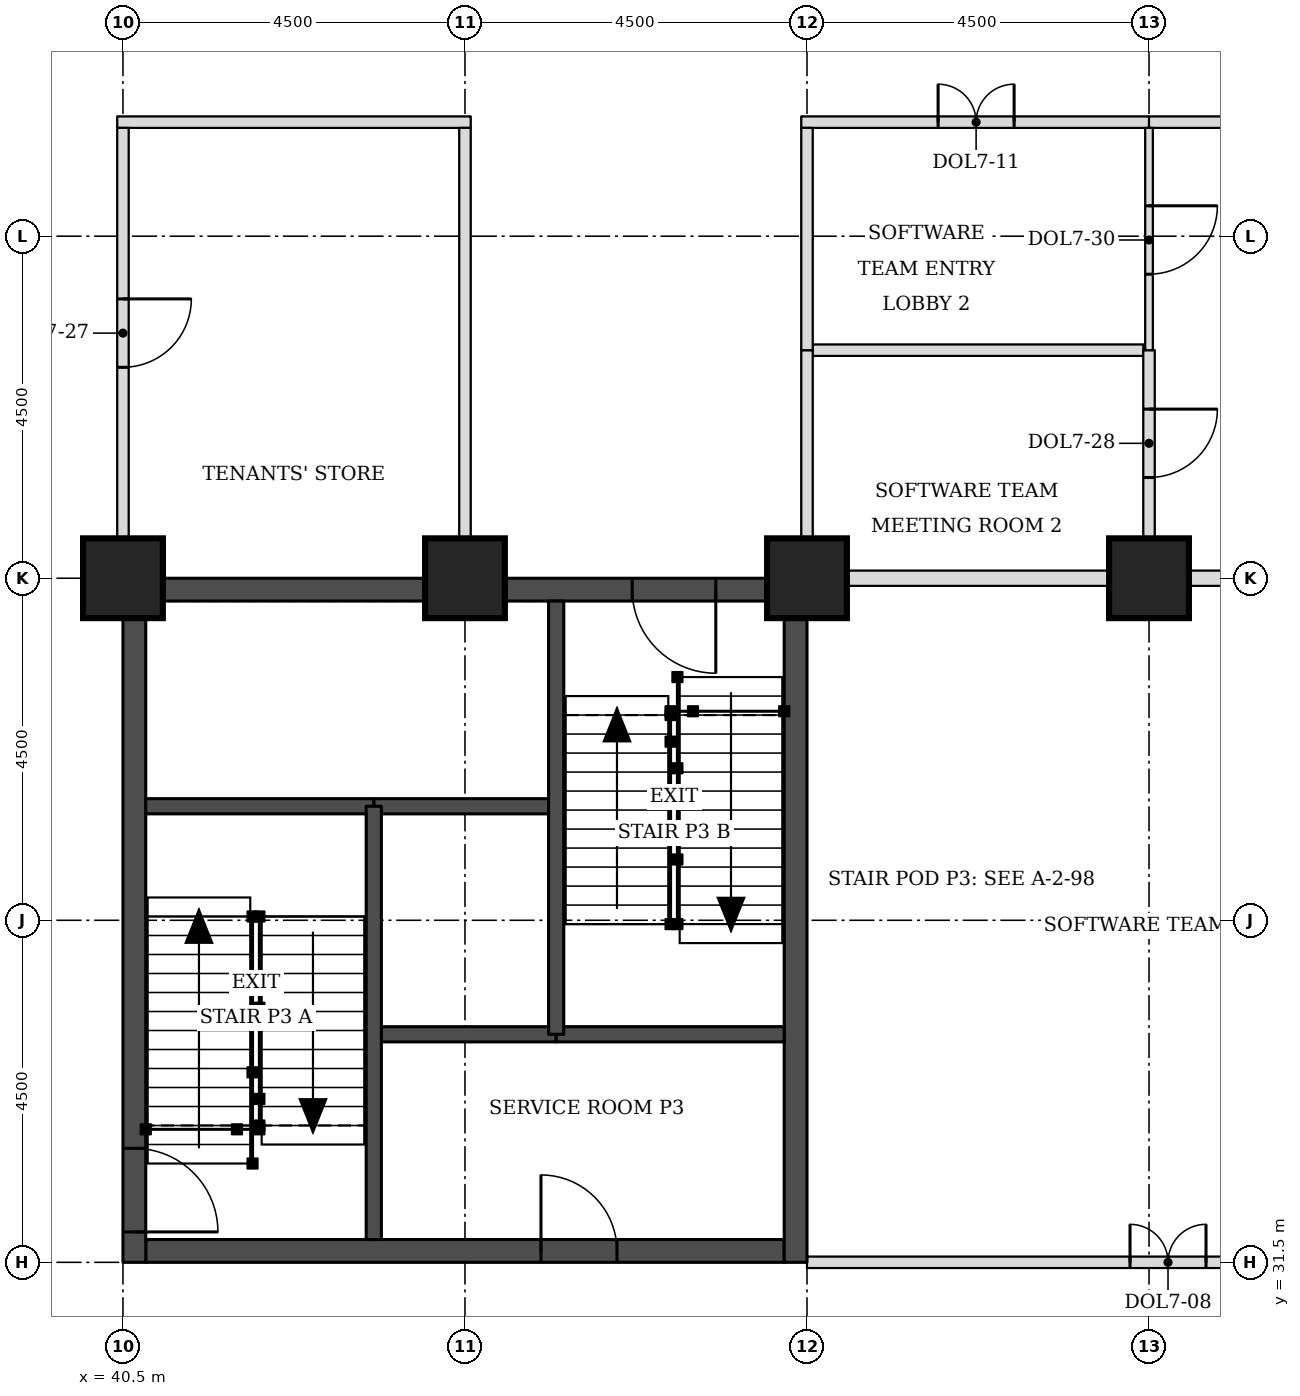
"""IFC4 building model, lengths in metres.
Left out: names, types, materials, properties, quantities, classifications, styles, units other than length and angle.
Written with IfcOpenShell. Run it as: python <this file> out.ifc"""

import sys

from ifc_helpers import new_model, si_unit, direction, frame, frame_2d, origin, origin_2d, place, context, subcontext, project, spatial, rectangle, extrude, element, fill, save


model = new_model("IFC4")
c1 = context("Model", 3, precision=1e-05, world=origin(), true_north=direction((0.0, 1.0)))
c2 = subcontext(c1, "Body", "Model", "MODEL_VIEW")
j1 = project(units=[si_unit("LENGTHUNIT", "METRE"), si_unit("PLANEANGLEUNIT", "RADIAN")], contexts=[c1])
p1 = place(None, origin())
s1 = spatial("IfcSite", under=j1, at=p1, CompositionType="ELEMENT")
p2 = place(p1, origin())
s2 = spatial("IfcBuilding", under=s1, at=p2, CompositionType="ELEMENT")
p3 = place(p2, frame((0.0, 0.0, 127.0)))
s3 = spatial("IfcBuildingStorey", under=s2, at=p3, CompositionType="ELEMENT", Elevation=127.0)
for number, where, z_axis, x_axis in (
    (1, (40.5, 40.5, 0.0), (0.0, 0.0, 1.0), (1.0, 0.0, 0.0)),
    (2, (45.0, 40.5, 0.0), (0.0, 0.0, 1.0), (1.0, 0.0, 0.0)),
    (3, (49.5, 40.5, 0.0), (0.0, 0.0, 1.0), (1.0, 0.0, 0.0)),
    (4, (54.0, 40.5, 0.0), (0.0, 0.0, 1.0), (1.0, 0.0, 0.0)),
):
    element("IfcColumn", number, at=place(p3, frame(where, z_axis=z_axis, x_axis=x_axis)), inside=s3, PredefinedType="COLUMN", context=c2, shape_type="SweptSolid", body=[
        extrude(rectangle(XDim=1.05, YDim=1.05, at=origin_2d()), origin(), (0.0, 0.0, 1.0), 3.7),
    ])
p4 = place(p3, frame((40.8, 31.65, 0.0), z_axis=(0.0, 0.0, 1.0), x_axis=(1.0, 0.0, 0.0)))
e5 = element("IfcWall", 5, at=p4, inside=s3, PredefinedType="SHEAR", context=c2, shape_type="SweptSolid", body=[
    extrude(rectangle(XDim=8.4, YDim=0.3, at=frame_2d((4.2, 0.0))), origin(), (0.0, 0.0, 1.0), 3.7),
])
p5 = place(p4, frame((5.2, 0.0, 0.0)))
e6 = element("IfcOpeningElement", 6, at=p5, cuts=e5, PredefinedType="OPENING", context=c2, shape_type="SweptSolid", body=[
    extrude(rectangle(XDim=1.0, YDim=2.1, at=frame_2d((0.5, 1.05))), frame((0.0, 0.16, 0.0), z_axis=(0.0, -1.0, 0.0), x_axis=(1.0, 0.0, 0.0)), (0.0, 0.0, 1.0), 0.32),
])
p6 = place(p3, frame((40.8, 40.35, 0.0), z_axis=(0.0, 0.0, 1.0), x_axis=(1.0, 0.0, 0.0)))
e7 = element("IfcWall", 7, at=p6, inside=s3, PredefinedType="SHEAR", context=c2, shape_type="SweptSolid", body=[
    extrude(rectangle(XDim=8.4, YDim=0.3, at=frame_2d((4.2, 0.0))), origin(), (0.0, 0.0, 1.0), 3.7),
])
p7 = place(p6, frame((6.4, 0.0, 0.0)))
e8 = element("IfcOpeningElement", 8, at=p7, cuts=e7, PredefinedType="OPENING", context=c2, shape_type="SweptSolid", body=[
    extrude(rectangle(XDim=1.1, YDim=2.1, at=frame_2d((0.55, 1.05))), frame((0.0, 0.16, 0.0), z_axis=(0.0, -1.0, 0.0), x_axis=(1.0, 0.0, 0.0)), (0.0, 0.0, 1.0), 0.32),
])
p8 = place(p3, frame((40.65, 31.5, 0.0), z_axis=(0.0, 0.0, 1.0), x_axis=(0.0, 1.0, 0.0)))
e9 = element("IfcWall", 9, at=p8, inside=s3, PredefinedType="SHEAR", context=c2, shape_type="SweptSolid", body=[
    extrude(rectangle(XDim=9.0, YDim=0.3, at=frame_2d((4.5, 0.0))), origin(), (0.0, 0.0, 1.0), 3.7),
])
p9 = place(p8, frame((0.4, 0.0, 0.0)))
e10 = element("IfcOpeningElement", 10, at=p9, cuts=e9, PredefinedType="OPENING", context=c2, shape_type="SweptSolid", body=[
    extrude(rectangle(XDim=1.1, YDim=2.1, at=frame_2d((0.55, 1.05))), frame((0.0, 0.16, 0.0), z_axis=(0.0, -1.0, 0.0), x_axis=(1.0, 0.0, 0.0)), (0.0, 0.0, 1.0), 0.32),
])
p10 = place(p3, frame((49.35, 31.5, 0.0), z_axis=(0.0, 0.0, 1.0), x_axis=(0.0, 1.0, 0.0)))
e11 = element("IfcWall", 11, at=p10, inside=s3, PredefinedType="SHEAR", context=c2, shape_type="SweptSolid", body=[
    extrude(rectangle(XDim=9.0, YDim=0.3, at=frame_2d((4.5, 0.0))), origin(), (0.0, 0.0, 1.0), 3.7),
])
p11 = place(p3, frame((49.5, 31.5, 0.0), z_axis=(0.0, 0.0, 1.0), x_axis=(1.0, 0.0, 0.0)))
e12 = element("IfcWall", 12, at=p11, inside=s3, PredefinedType="PARTITIONING", context=c2, shape_type="SweptSolid", body=[
    extrude(rectangle(XDim=9.525, YDim=0.15, at=frame_2d((4.762, 0.0))), origin(), (0.0, 0.0, 1.0), 2.55),
])
p12 = place(p11, frame((4.25, 0.0, 0.0)))
e13 = element("IfcOpeningElement", 13, at=p12, cuts=e12, PredefinedType="OPENING", context=c2, shape_type="SweptSolid", body=[
    extrude(rectangle(XDim=1.0, YDim=2.1, at=frame_2d((0.5, 1.05))), frame((0.0, 0.085, 0.0), z_axis=(0.0, -1.0, 0.0), x_axis=(1.0, 0.0, 0.0)), (0.0, 0.0, 1.0), 0.17),
])
p13 = place(p3, frame((50.015, 40.5, 0.0), z_axis=(0.0, 0.0, 1.0), x_axis=(1.0, 0.0, 0.0)))
e14 = element("IfcWall", 14, at=p13, inside=s3, PredefinedType="PARTITIONING", context=c2, shape_type="SweptSolid", body=[
    extrude(rectangle(XDim=3.46, YDim=0.2, at=frame_2d((1.73, 0.0))), origin(), (0.0, 0.0, 1.0), 2.8),
])
p14 = place(p3, frame((54.495, 40.5, 0.0), z_axis=(0.0, 0.0, 1.0), x_axis=(1.0, 0.0, 0.0)))
e15 = element("IfcWall", 15, at=p14, inside=s3, PredefinedType="PARTITIONING", context=c2, shape_type="SweptSolid", body=[
    extrude(rectangle(XDim=3.48, YDim=0.2, at=frame_2d((1.74, 0.0))), origin(), (0.0, 0.0, 1.0), 2.8),
])
p15 = place(p3, frame((49.575, 43.5, 0.0), z_axis=(0.0, 0.0, 1.0), x_axis=(1.0, 0.0, 0.0)))
e16 = element("IfcWall", 16, at=p15, inside=s3, PredefinedType="PARTITIONING", context=c2, shape_type="SweptSolid", body=[
    extrude(rectangle(XDim=4.35, YDim=0.15, at=frame_2d((2.175, 0.0))), origin(), (0.0, 0.0, 1.0), 3.55),
])
p16 = place(p3, frame((40.425, 46.5, 0.0), z_axis=(0.0, 0.0, 1.0), x_axis=(1.0, 0.0, 0.0)))
e17 = element("IfcWall", 17, at=p16, inside=s3, PredefinedType="PARTITIONING", context=c2, shape_type="SweptSolid", body=[
    extrude(rectangle(XDim=4.65, YDim=0.15, at=frame_2d((2.325, 0.0))), origin(), (0.0, 0.0, 1.0), 3.55),
])
p17 = place(p3, frame((49.425, 46.5, 0.0), z_axis=(0.0, 0.0, 1.0), x_axis=(1.0, 0.0, 0.0)))
e18 = element("IfcWall", 18, at=p17, inside=s3, PredefinedType="PARTITIONING", context=c2, shape_type="SweptSolid", body=[
    extrude(rectangle(XDim=4.575, YDim=0.15, at=frame_2d((2.288, 0.0))), origin(), (0.0, 0.0, 1.0), 3.55),
])
p18 = place(p17, frame((1.8, 0.0, 0.0)))
e19 = element("IfcOpeningElement", 19, at=p18, cuts=e18, PredefinedType="OPENING", context=c2, shape_type="SweptSolid", body=[
    extrude(rectangle(XDim=1.0, YDim=2.1, at=frame_2d((0.5, 1.05))), frame((0.0, 0.085, 0.0), z_axis=(0.0, -1.0, 0.0), x_axis=(1.0, 0.0, 0.0)), (0.0, 0.0, 1.0), 0.17),
])
p19 = place(p3, frame((54.0, 46.5, 0.0), z_axis=(0.0, 0.0, 1.0), x_axis=(1.0, 0.0, 0.0)))
e20 = element("IfcWall", 20, at=p19, inside=s3, PredefinedType="PARTITIONING", context=c2, shape_type="SweptSolid", body=[
    extrude(rectangle(XDim=6.0, YDim=0.15, at=frame_2d((3.0, 0.0))), origin(), (0.0, 0.0, 1.0), 3.55),
])
p20 = place(p3, frame((40.5, 41.025, 0.0), z_axis=(0.0, 0.0, 1.0), x_axis=(0.0, 1.0, 0.0)))
e21 = element("IfcWall", 21, at=p20, inside=s3, PredefinedType="PARTITIONING", context=c2, shape_type="SweptSolid", body=[
    extrude(rectangle(XDim=5.4, YDim=0.15, at=frame_2d((2.7, 0.0))), origin(), (0.0, 0.0, 1.0), 3.55),
])
p21 = place(p20, frame((2.25, 0.0, 0.0)))
e22 = element("IfcOpeningElement", 22, at=p21, cuts=e21, PredefinedType="OPENING", context=c2, shape_type="SweptSolid", body=[
    extrude(rectangle(XDim=0.9, YDim=2.1, at=frame_2d((0.45, 1.05))), frame((0.0, 0.085, 0.0), z_axis=(0.0, -1.0, 0.0), x_axis=(1.0, 0.0, 0.0)), (0.0, 0.0, 1.0), 0.17),
])
p22 = place(p3, frame((45.0, 41.025, 0.0), z_axis=(0.0, 0.0, 1.0), x_axis=(0.0, 1.0, 0.0)))
e23 = element("IfcWall", 23, at=p22, inside=s3, PredefinedType="PARTITIONING", context=c2, shape_type="SweptSolid", body=[
    extrude(rectangle(XDim=5.4, YDim=0.15, at=frame_2d((2.7, 0.0))), origin(), (0.0, 0.0, 1.0), 3.55),
])
p23 = place(p3, frame((49.5, 41.025, 0.0), z_axis=(0.0, 0.0, 1.0), x_axis=(0.0, 1.0, 0.0)))
e24 = element("IfcWall", 24, at=p23, inside=s3, PredefinedType="PARTITIONING", context=c2, shape_type="SweptSolid", body=[
    extrude(rectangle(XDim=2.475, YDim=0.15, at=frame_2d((1.238, 0.0))), origin(), (0.0, 0.0, 1.0), 3.55),
])
p24 = place(p3, frame((54.0, 41.025, 0.0), z_axis=(0.0, 0.0, 1.0), x_axis=(0.0, 1.0, 0.0)))
e25 = element("IfcWall", 25, at=p24, inside=s3, PredefinedType="PARTITIONING", context=c2, shape_type="SweptSolid", body=[
    extrude(rectangle(XDim=2.475, YDim=0.15, at=frame_2d((1.238, 0.0))), origin(), (0.0, 0.0, 1.0), 3.55),
])
p25 = place(p24, frame((0.8, 0.0, 0.0)))
e26 = element("IfcOpeningElement", 26, at=p25, cuts=e25, PredefinedType="OPENING", context=c2, shape_type="SweptSolid", body=[
    extrude(rectangle(XDim=0.9, YDim=2.1, at=frame_2d((0.45, 1.05))), frame((0.0, 0.085, 0.0), z_axis=(0.0, -1.0, 0.0), x_axis=(1.0, 0.0, 0.0)), (0.0, 0.0, 1.0), 0.17),
])
p26 = place(p3, frame((49.5, 43.5, 0.0), z_axis=(0.0, 0.0, 1.0), x_axis=(0.0, 1.0, 0.0)))
e27 = element("IfcWall", 27, at=p26, inside=s3, PredefinedType="PARTITIONING", context=c2, shape_type="SweptSolid", body=[
    extrude(rectangle(XDim=2.925, YDim=0.15, at=frame_2d((1.462, 0.0))), origin(), (0.0, 0.0, 1.0), 3.55),
])
p27 = place(p3, frame((54.0, 43.5, 0.0), z_axis=(0.0, 0.0, 1.0), x_axis=(0.0, 1.0, 0.0)))
e28 = element("IfcWall", 28, at=p27, inside=s3, PredefinedType="PARTITIONING", context=c2, shape_type="SweptSolid", body=[
    extrude(rectangle(XDim=2.925, YDim=0.1, at=frame_2d((1.462, 0.0))), origin(), (0.0, 0.0, 1.0), 3.55),
])
p28 = place(p27, frame((1.0, 0.0, 0.0)))
e29 = element("IfcOpeningElement", 29, at=p28, cuts=e28, PredefinedType="OPENING", context=c2, shape_type="SweptSolid", body=[
    extrude(rectangle(XDim=0.9, YDim=2.1, at=frame_2d((0.45, 1.05))), frame((0.0, 0.06, 0.0), z_axis=(0.0, -1.0, 0.0), x_axis=(1.0, 0.0, 0.0)), (0.0, 0.0, 1.0), 0.12),
])
p29 = place(p3, frame((43.8, 34.5, 0.0), z_axis=(0.0, 0.0, 1.0), x_axis=(1.0, 0.0, 0.0)))
e30 = element("IfcWall", 30, at=p29, inside=s3, PredefinedType="SOLIDWALL", context=c2, shape_type="SweptSolid", body=[
    extrude(rectangle(XDim=2.4, YDim=0.2, at=frame_2d((1.2, 0.0))), origin(), (0.0, 0.0, 1.0), 3.55),
])
p30 = place(p3, frame((46.2, 34.5, 0.0), z_axis=(0.0, 0.0, 1.0), x_axis=(1.0, 0.0, 0.0)))
e31 = element("IfcWall", 31, at=p30, inside=s3, PredefinedType="SOLIDWALL", context=c2, shape_type="SweptSolid", body=[
    extrude(rectangle(XDim=3.0, YDim=0.2, at=frame_2d((1.5, 0.0))), origin(), (0.0, 0.0, 1.0), 3.55),
])
p31 = place(p3, frame((43.8, 37.5, 0.0), z_axis=(0.0, 0.0, 1.0), x_axis=(1.0, 0.0, 0.0)))
e32 = element("IfcWall", 32, at=p31, inside=s3, PredefinedType="SOLIDWALL", context=c2, shape_type="SweptSolid", body=[
    extrude(rectangle(XDim=2.4, YDim=0.2, at=frame_2d((1.2, 0.0))), origin(), (0.0, 0.0, 1.0), 3.7),
])
p32 = place(p3, frame((40.8, 37.5, 0.0), z_axis=(0.0, 0.0, 1.0), x_axis=(1.0, 0.0, 0.0)))
e33 = element("IfcWall", 33, at=p32, inside=s3, PredefinedType="SOLIDWALL", context=c2, shape_type="SweptSolid", body=[
    extrude(rectangle(XDim=3.0, YDim=0.2, at=frame_2d((1.5, 0.0))), origin(), (0.0, 0.0, 1.0), 3.55),
])
for number, where, z_axis, x_axis in (
    (34, (43.8, 31.8, 0.0), (0.0, 0.0, 1.0), (0.0, 1.0, 0.0)),
    (35, (46.2, 34.5, 0.0), (0.0, 0.0, 1.0), (0.0, 1.0, 0.0)),
):
    element("IfcWall", number, at=place(p3, frame(where, z_axis=z_axis, x_axis=x_axis)), inside=s3, PredefinedType="SOLIDWALL", context=c2, shape_type="SweptSolid", body=[
        extrude(rectangle(XDim=5.7, YDim=0.2, at=frame_2d((2.85, 0.0))), origin(), (0.0, 0.0, 1.0), 3.55),
    ])
p33 = place(p21, frame((0.9, 0.0, 0.0), z_axis=(0.0, 0.0, 1.0), x_axis=(-1.0, 0.0, 0.0)))
e36 = element("IfcDoor", 36, at=p33, inside=s3, OperationType="SINGLE_SWING_LEFT", PredefinedType="DOOR", context=c2, shape_type="SweptSolid", body=[
    extrude(rectangle(XDim=0.9, YDim=2.1, at=frame_2d((0.45, 1.05))), frame((0.0, 0.025, 0.0), z_axis=(0.0, -1.0, 0.0), x_axis=(1.0, 0.0, 0.0)), (0.0, 0.0, 1.0), 0.05),
])
fill(e22, e36)
p34 = place(p12, origin())
e37 = element("IfcDoor", 37, at=p34, inside=s3, OperationType="DOUBLE_DOOR_SINGLE_SWING", PredefinedType="DOOR", context=c2, shape_type="SweptSolid", body=[
    extrude(rectangle(XDim=1.0, YDim=2.1, at=frame_2d((0.5, 1.05))), frame((0.0, 0.025, 0.0), z_axis=(0.0, -1.0, 0.0), x_axis=(1.0, 0.0, 0.0)), (0.0, 0.0, 1.0), 0.05),
])
fill(e13, e37)
p35 = place(p18, origin())
e38 = element("IfcDoor", 38, at=p35, inside=s3, OperationType="DOUBLE_DOOR_SINGLE_SWING", PredefinedType="DOOR", context=c2, shape_type="SweptSolid", body=[
    extrude(rectangle(XDim=1.0, YDim=2.1, at=frame_2d((0.5, 1.05))), frame((0.0, 0.025, 0.0), z_axis=(0.0, -1.0, 0.0), x_axis=(1.0, 0.0, 0.0)), (0.0, 0.0, 1.0), 0.05),
])
fill(e19, e38)
p36 = place(p28, frame((0.9, 0.0, 0.0), z_axis=(0.0, 0.0, 1.0), x_axis=(-1.0, 0.0, 0.0)))
e39 = element("IfcDoor", 39, at=p36, inside=s3, OperationType="SINGLE_SWING_LEFT", PredefinedType="DOOR", context=c2, shape_type="SweptSolid", body=[
    extrude(rectangle(XDim=0.9, YDim=2.1, at=frame_2d((0.45, 1.05))), frame((0.0, 0.025, 0.0), z_axis=(0.0, -1.0, 0.0), x_axis=(1.0, 0.0, 0.0)), (0.0, 0.0, 1.0), 0.05),
])
fill(e29, e39)
p37 = place(p25, frame((0.9, 0.0, 0.0), z_axis=(0.0, 0.0, 1.0), x_axis=(-1.0, 0.0, 0.0)))
e40 = element("IfcDoor", 40, at=p37, inside=s3, OperationType="SINGLE_SWING_LEFT", PredefinedType="DOOR", context=c2, shape_type="SweptSolid", body=[
    extrude(rectangle(XDim=0.9, YDim=2.1, at=frame_2d((0.45, 1.05))), frame((0.0, 0.025, 0.0), z_axis=(0.0, -1.0, 0.0), x_axis=(1.0, 0.0, 0.0)), (0.0, 0.0, 1.0), 0.05),
])
fill(e26, e40)
p38 = place(p9, frame((1.1, 0.0, 0.0), z_axis=(0.0, 0.0, 1.0), x_axis=(-1.0, 0.0, 0.0)))
e41 = element("IfcDoor", 41, at=p38, inside=s3, OperationType="SINGLE_SWING_RIGHT", PredefinedType="DOOR", context=c2, shape_type="SweptSolid", body=[
    extrude(rectangle(XDim=1.1, YDim=2.1, at=frame_2d((0.55, 1.05))), frame((0.0, 0.025, 0.0), z_axis=(0.0, -1.0, 0.0), x_axis=(1.0, 0.0, 0.0)), (0.0, 0.0, 1.0), 0.05),
])
fill(e10, e41)
p39 = place(p7, frame((1.1, 0.0, 0.0), z_axis=(0.0, 0.0, 1.0), x_axis=(-1.0, 0.0, 0.0)))
e42 = element("IfcDoor", 42, at=p39, inside=s3, OperationType="SINGLE_SWING_LEFT", PredefinedType="DOOR", context=c2, shape_type="SweptSolid", body=[
    extrude(rectangle(XDim=1.1, YDim=2.1, at=frame_2d((0.55, 1.05))), frame((0.0, 0.025, 0.0), z_axis=(0.0, -1.0, 0.0), x_axis=(1.0, 0.0, 0.0)), (0.0, 0.0, 1.0), 0.05),
])
fill(e8, e42)
p40 = place(p5, origin())
e43 = element("IfcDoor", 43, at=p40, inside=s3, OperationType="SINGLE_SWING_LEFT", PredefinedType="DOOR", context=c2, shape_type="SweptSolid", body=[
    extrude(rectangle(XDim=1.0, YDim=2.1, at=frame_2d((0.5, 1.05))), frame((0.0, 0.025, 0.0), z_axis=(0.0, -1.0, 0.0), x_axis=(1.0, 0.0, 0.0)), (0.0, 0.0, 1.0), 0.05),
])
fill(e6, e43)
save(model, sys.argv[1])
